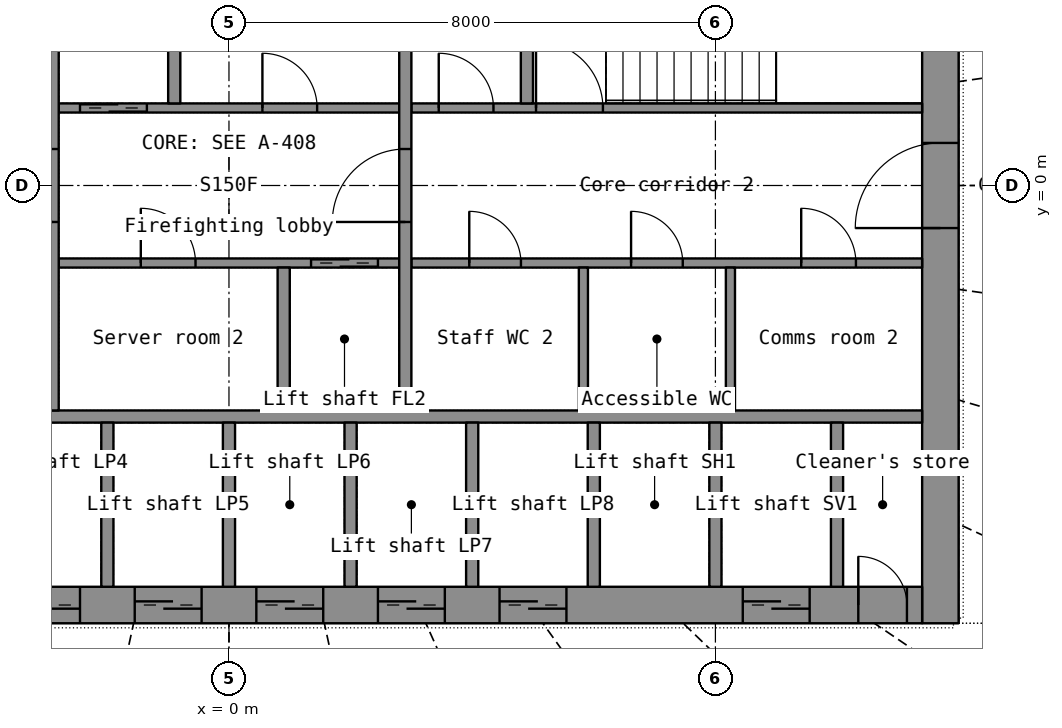
"""IFC4 building model, lengths in metres.
Left out: names, types, materials, properties, quantities, classifications, styles, units other than length and angle.
Written with IfcOpenShell. Run it as: python <this file> out.ifc"""

import sys

from ifc_helpers import new_model, si_unit, direction, frame, frame_2d, origin, place, context, subcontext, project, spatial, rectangle, extrude, element, fill, save


model = new_model("IFC4")
c1 = context("Model", 3, precision=1e-05, world=origin(), true_north=direction((0.0, 1.0)))
c2 = subcontext(c1, "Body", "Model", "MODEL_VIEW")
j1 = project(units=[si_unit("LENGTHUNIT", "METRE"), si_unit("PLANEANGLEUNIT", "RADIAN")], contexts=[c1])
p1 = place(None, origin())
s1 = spatial("IfcSite", under=j1, at=p1, CompositionType="ELEMENT")
p2 = place(p1, origin())
s2 = spatial("IfcBuilding", under=s1, at=p2, CompositionType="ELEMENT")
p3 = place(p2, frame((0.0, 0.0, 40.8)))
s3 = spatial("IfcBuildingStorey", under=s2, at=p3, CompositionType="ELEMENT", Elevation=40.8)
p4 = place(p3, frame((11.7, -7.2, 0.0), z_axis=(0.0, 0.0, 1.0), x_axis=(0.0, 1.0, 0.0)))
e1 = element("IfcWall", 1, at=p4, inside=s3, PredefinedType="SHEAR", context=c2, shape_type="SweptSolid", body=[
    extrude(rectangle(XDim=14.4, YDim=0.6, at=frame_2d((7.2, 0.0))), origin(), (0.0, 0.0, 1.0), 3.3),
])
p5 = place(p4, frame((6.5, 0.0, 0.0)))
e2 = element("IfcOpeningElement", 2, at=p5, cuts=e1, PredefinedType="OPENING", context=c2, shape_type="SweptSolid", body=[
    extrude(rectangle(XDim=1.4, YDim=2.2, at=frame_2d((0.7, 1.1))), frame((0.0, 0.31, 0.0), z_axis=(0.0, -1.0, 0.0), x_axis=(1.0, 0.0, 0.0)), (0.0, 0.0, 1.0), 0.62),
])
p6 = place(p3, frame((-11.4, -6.9, 0.0), z_axis=(0.0, 0.0, 1.0), x_axis=(1.0, 0.0, 0.0)))
e3 = element("IfcWall", 3, at=p6, inside=s3, PredefinedType="SHEAR", context=c2, shape_type="SweptSolid", body=[
    extrude(rectangle(XDim=22.8, YDim=0.6, at=frame_2d((11.4, 0.0))), origin(), (0.0, 0.0, 1.0), 3.3),
])
p7 = place(p6, frame((1.85, 0.0, 0.0)))
e4 = element("IfcOpeningElement", 4, at=p7, cuts=e3, PredefinedType="OPENING", context=c2, shape_type="SweptSolid", body=[
    extrude(rectangle(XDim=1.1, YDim=2.2, at=frame_2d((0.55, 1.1))), frame((0.0, 0.31, 0.0), z_axis=(0.0, -1.0, 0.0), x_axis=(1.0, 0.0, 0.0)), (0.0, 0.0, 1.0), 0.62),
])
p8 = place(p6, frame((3.85, 0.0, 0.0)))
e5 = element("IfcOpeningElement", 5, at=p8, cuts=e3, PredefinedType="OPENING", context=c2, shape_type="SweptSolid", body=[
    extrude(rectangle(XDim=1.1, YDim=2.2, at=frame_2d((0.55, 1.1))), frame((0.0, 0.31, 0.0), z_axis=(0.0, -1.0, 0.0), x_axis=(1.0, 0.0, 0.0)), (0.0, 0.0, 1.0), 0.62),
])
p9 = place(p6, frame((5.85, 0.0, 0.0)))
e6 = element("IfcOpeningElement", 6, at=p9, cuts=e3, PredefinedType="OPENING", context=c2, shape_type="SweptSolid", body=[
    extrude(rectangle(XDim=1.1, YDim=2.2, at=frame_2d((0.55, 1.1))), frame((0.0, 0.31, 0.0), z_axis=(0.0, -1.0, 0.0), x_axis=(1.0, 0.0, 0.0)), (0.0, 0.0, 1.0), 0.62),
])
p10 = place(p6, frame((7.85, 0.0, 0.0)))
e7 = element("IfcOpeningElement", 7, at=p10, cuts=e3, PredefinedType="OPENING", context=c2, shape_type="SweptSolid", body=[
    extrude(rectangle(XDim=1.1, YDim=2.2, at=frame_2d((0.55, 1.1))), frame((0.0, 0.31, 0.0), z_axis=(0.0, -1.0, 0.0), x_axis=(1.0, 0.0, 0.0)), (0.0, 0.0, 1.0), 0.62),
])
p11 = place(p6, frame((9.85, 0.0, 0.0)))
e8 = element("IfcOpeningElement", 8, at=p11, cuts=e3, PredefinedType="OPENING", context=c2, shape_type="SweptSolid", body=[
    extrude(rectangle(XDim=1.1, YDim=2.2, at=frame_2d((0.55, 1.1))), frame((0.0, 0.31, 0.0), z_axis=(0.0, -1.0, 0.0), x_axis=(1.0, 0.0, 0.0)), (0.0, 0.0, 1.0), 0.62),
])
p12 = place(p6, frame((11.85, 0.0, 0.0)))
e9 = element("IfcOpeningElement", 9, at=p12, cuts=e3, PredefinedType="OPENING", context=c2, shape_type="SweptSolid", body=[
    extrude(rectangle(XDim=1.1, YDim=2.2, at=frame_2d((0.55, 1.1))), frame((0.0, 0.31, 0.0), z_axis=(0.0, -1.0, 0.0), x_axis=(1.0, 0.0, 0.0)), (0.0, 0.0, 1.0), 0.62),
])
p13 = place(p6, frame((13.85, 0.0, 0.0)))
e10 = element("IfcOpeningElement", 10, at=p13, cuts=e3, PredefinedType="OPENING", context=c2, shape_type="SweptSolid", body=[
    extrude(rectangle(XDim=1.1, YDim=2.2, at=frame_2d((0.55, 1.1))), frame((0.0, 0.31, 0.0), z_axis=(0.0, -1.0, 0.0), x_axis=(1.0, 0.0, 0.0)), (0.0, 0.0, 1.0), 0.62),
])
p14 = place(p6, frame((15.85, 0.0, 0.0)))
e11 = element("IfcOpeningElement", 11, at=p14, cuts=e3, PredefinedType="OPENING", context=c2, shape_type="SweptSolid", body=[
    extrude(rectangle(XDim=1.1, YDim=2.2, at=frame_2d((0.55, 1.1))), frame((0.0, 0.31, 0.0), z_axis=(0.0, -1.0, 0.0), x_axis=(1.0, 0.0, 0.0)), (0.0, 0.0, 1.0), 0.62),
])
p15 = place(p6, frame((19.85, 0.0, 0.0)))
e12 = element("IfcOpeningElement", 12, at=p15, cuts=e3, PredefinedType="OPENING", context=c2, shape_type="SweptSolid", body=[
    extrude(rectangle(XDim=1.1, YDim=2.2, at=frame_2d((0.55, 1.1))), frame((0.0, 0.31, 0.0), z_axis=(0.0, -1.0, 0.0), x_axis=(1.0, 0.0, 0.0)), (0.0, 0.0, 1.0), 0.62),
])
p16 = place(p6, frame((0.25, 0.0, 0.0)))
e13 = element("IfcOpeningElement", 13, at=p16, cuts=e3, PredefinedType="OPENING", context=c2, shape_type="SweptSolid", body=[
    extrude(rectangle(XDim=0.8, YDim=2.05, at=frame_2d((0.4, 1.025))), frame((0.0, 0.31, 0.0), z_axis=(0.0, -1.0, 0.0), x_axis=(1.0, 0.0, 0.0)), (0.0, 0.0, 1.0), 0.62),
])
p17 = place(p6, frame((21.75, 0.0, 0.0)))
e14 = element("IfcOpeningElement", 14, at=p17, cuts=e3, PredefinedType="OPENING", context=c2, shape_type="SweptSolid", body=[
    extrude(rectangle(XDim=0.8, YDim=2.05, at=frame_2d((0.4, 1.025))), frame((0.0, 0.31, 0.0), z_axis=(0.0, -1.0, 0.0), x_axis=(1.0, 0.0, 0.0)), (0.0, 0.0, 1.0), 0.62),
])
p18 = place(p3, frame((-11.4, -3.8, 0.0), z_axis=(0.0, 0.0, 1.0), x_axis=(1.0, 0.0, 0.0)))
e15 = element("IfcWall", 15, at=p18, inside=s3, PredefinedType="SHEAR", context=c2, shape_type="SweptSolid", body=[
    extrude(rectangle(XDim=22.8, YDim=0.2, at=frame_2d((11.4, 0.0))), origin(), (0.0, 0.0, 1.0), 3.3),
])
for number, where, z_axis, x_axis in (
    (16, (-2.0, -6.6, 0.0), (0.0, 0.0, 1.0), (0.0, 1.0, 0.0)),
    (17, (0.0, -6.6, 0.0), (0.0, 0.0, 1.0), (0.0, 1.0, 0.0)),
    (18, (2.0, -6.6, 0.0), (0.0, 0.0, 1.0), (0.0, 1.0, 0.0)),
    (19, (4.0, -6.6, 0.0), (0.0, 0.0, 1.0), (0.0, 1.0, 0.0)),
    (20, (6.0, -6.6, 0.0), (0.0, 0.0, 1.0), (0.0, 1.0, 0.0)),
    (21, (8.0, -6.6, 0.0), (0.0, 0.0, 1.0), (0.0, 1.0, 0.0)),
    (22, (10.0, -6.6, 0.0), (0.0, 0.0, 1.0), (0.0, 1.0, 0.0)),
):
    element("IfcWall", number, at=place(p3, frame(where, z_axis=z_axis, x_axis=x_axis)), inside=s3, PredefinedType="SHEAR", context=c2, shape_type="SweptSolid", body=[
        extrude(rectangle(XDim=2.7, YDim=0.2, at=frame_2d((1.35, 0.0))), origin(), (0.0, 0.0, 1.0), 3.3),
    ])
p19 = place(p3, frame((-2.8, -1.275, 0.0), z_axis=(0.0, 0.0, 1.0), x_axis=(1.0, 0.0, 0.0)))
e23 = element("IfcWall", 23, at=p19, inside=s3, PredefinedType="SHEAR", context=c2, shape_type="SweptSolid", body=[
    extrude(rectangle(XDim=5.6, YDim=0.15, at=frame_2d((2.8, 0.0))), origin(), (0.0, 0.0, 1.0), 3.3),
])
p20 = place(p19, frame((4.15, 0.0, 0.0)))
e24 = element("IfcOpeningElement", 24, at=p20, cuts=e23, PredefinedType="OPENING", context=c2, shape_type="SweptSolid", body=[
    extrude(rectangle(XDim=1.1, YDim=2.2, at=frame_2d((0.55, 1.1))), frame((0.0, 0.085, 0.0), z_axis=(0.0, -1.0, 0.0), x_axis=(1.0, 0.0, 0.0)), (0.0, 0.0, 1.0), 0.17),
])
p21 = place(p19, frame((1.35, 0.0, 0.0)))
e25 = element("IfcOpeningElement", 25, at=p21, cuts=e23, PredefinedType="OPENING", context=c2, shape_type="SweptSolid", body=[
    extrude(rectangle(XDim=0.9, YDim=2.1, at=frame_2d((0.45, 1.05))), frame((0.0, 0.085, 0.0), z_axis=(0.0, -1.0, 0.0), x_axis=(1.0, 0.0, 0.0)), (0.0, 0.0, 1.0), 0.17),
])
p22 = place(p3, frame((3.0, -1.275, 0.0), z_axis=(0.0, 0.0, 1.0), x_axis=(1.0, 0.0, 0.0)))
e26 = element("IfcWall", 26, at=p22, inside=s3, PredefinedType="PARTITIONING", context=c2, shape_type="SweptSolid", body=[
    extrude(rectangle(XDim=8.4, YDim=0.15, at=frame_2d((4.2, 0.0))), origin(), (0.0, 0.0, 1.0), 3.3),
])
p23 = place(p22, frame((0.952, 0.0, 0.0)))
e27 = element("IfcOpeningElement", 27, at=p23, cuts=e26, PredefinedType="OPENING", context=c2, shape_type="SweptSolid", body=[
    extrude(rectangle(XDim=0.85, YDim=2.1, at=frame_2d((0.425, 1.05))), frame((0.0, 0.085, 0.0), z_axis=(0.0, -1.0, 0.0), x_axis=(1.0, 0.0, 0.0)), (0.0, 0.0, 1.0), 0.17),
])
p24 = place(p22, frame((3.613, 0.0, 0.0)))
e28 = element("IfcOpeningElement", 28, at=p24, cuts=e26, PredefinedType="OPENING", context=c2, shape_type="SweptSolid", body=[
    extrude(rectangle(XDim=0.85, YDim=2.1, at=frame_2d((0.425, 1.05))), frame((0.0, 0.085, 0.0), z_axis=(0.0, -1.0, 0.0), x_axis=(1.0, 0.0, 0.0)), (0.0, 0.0, 1.0), 0.17),
])
p25 = place(p22, frame((6.411, 0.0, 0.0)))
e29 = element("IfcOpeningElement", 29, at=p25, cuts=e26, PredefinedType="OPENING", context=c2, shape_type="SweptSolid", body=[
    extrude(rectangle(XDim=0.9, YDim=2.1, at=frame_2d((0.45, 1.05))), frame((0.0, 0.085, 0.0), z_axis=(0.0, -1.0, 0.0), x_axis=(1.0, 0.0, 0.0)), (0.0, 0.0, 1.0), 0.17),
])
p26 = place(p3, frame((-2.8, 1.275, 0.0), z_axis=(0.0, 0.0, 1.0), x_axis=(1.0, 0.0, 0.0)))
e30 = element("IfcWall", 30, at=p26, inside=s3, PredefinedType="SHEAR", context=c2, shape_type="SweptSolid", body=[
    extrude(rectangle(XDim=5.6, YDim=0.15, at=frame_2d((2.8, 0.0))), origin(), (0.0, 0.0, 1.0), 3.3),
])
p27 = place(p26, frame((0.35, 0.0, 0.0)))
e31 = element("IfcOpeningElement", 31, at=p27, cuts=e30, PredefinedType="OPENING", context=c2, shape_type="SweptSolid", body=[
    extrude(rectangle(XDim=1.1, YDim=2.2, at=frame_2d((0.55, 1.1))), frame((0.0, 0.085, 0.0), z_axis=(0.0, -1.0, 0.0), x_axis=(1.0, 0.0, 0.0)), (0.0, 0.0, 1.0), 0.17),
])
p28 = place(p26, frame((3.35, 0.0, 0.0)))
e32 = element("IfcOpeningElement", 32, at=p28, cuts=e30, PredefinedType="OPENING", context=c2, shape_type="SweptSolid", body=[
    extrude(rectangle(XDim=0.9, YDim=2.1, at=frame_2d((0.45, 1.05))), frame((0.0, 0.085, 0.0), z_axis=(0.0, -1.0, 0.0), x_axis=(1.0, 0.0, 0.0)), (0.0, 0.0, 1.0), 0.17),
])
p29 = place(p3, frame((3.0, 1.275, 0.0), z_axis=(0.0, 0.0, 1.0), x_axis=(1.0, 0.0, 0.0)))
e33 = element("IfcWall", 33, at=p29, inside=s3, PredefinedType="SHEAR", context=c2, shape_type="SweptSolid", body=[
    extrude(rectangle(XDim=8.4, YDim=0.15, at=frame_2d((4.2, 0.0))), origin(), (0.0, 0.0, 1.0), 3.3),
])
p30 = place(p29, frame((2.05, 0.0, 0.0)))
e34 = element("IfcOpeningElement", 34, at=p30, cuts=e33, PredefinedType="OPENING", context=c2, shape_type="SweptSolid", body=[
    extrude(rectangle(XDim=1.1, YDim=2.15, at=frame_2d((0.55, 1.075))), frame((0.0, 0.085, 0.0), z_axis=(0.0, -1.0, 0.0), x_axis=(1.0, 0.0, 0.0)), (0.0, 0.0, 1.0), 0.17),
])
p31 = place(p29, frame((0.45, 0.0, 0.0)))
e35 = element("IfcOpeningElement", 35, at=p31, cuts=e33, PredefinedType="OPENING", context=c2, shape_type="SweptSolid", body=[
    extrude(rectangle(XDim=0.9, YDim=2.1, at=frame_2d((0.45, 1.05))), frame((0.0, 0.085, 0.0), z_axis=(0.0, -1.0, 0.0), x_axis=(1.0, 0.0, 0.0)), (0.0, 0.0, 1.0), 0.17),
])
p32 = place(p3, frame((-2.9, -3.7, 0.0), z_axis=(0.0, 0.0, 1.0), x_axis=(0.0, 1.0, 0.0)))
e36 = element("IfcWall", 36, at=p32, inside=s3, PredefinedType="SHEAR", context=c2, shape_type="SweptSolid", body=[
    extrude(rectangle(XDim=7.4, YDim=0.2, at=frame_2d((3.7, 0.0))), origin(), (0.0, 0.0, 1.0), 3.3),
])
p33 = place(p32, frame((3.1, 0.0, 0.0)))
e37 = element("IfcOpeningElement", 37, at=p33, cuts=e36, PredefinedType="OPENING", context=c2, shape_type="SweptSolid", body=[
    extrude(rectangle(XDim=1.2, YDim=2.2, at=frame_2d((0.6, 1.1))), frame((0.0, 0.11, 0.0), z_axis=(0.0, -1.0, 0.0), x_axis=(1.0, 0.0, 0.0)), (0.0, 0.0, 1.0), 0.22),
])
p34 = place(p3, frame((2.9, -3.7, 0.0), z_axis=(0.0, 0.0, 1.0), x_axis=(0.0, 1.0, 0.0)))
e38 = element("IfcWall", 38, at=p34, inside=s3, PredefinedType="SHEAR", context=c2, shape_type="SweptSolid", body=[
    extrude(rectangle(XDim=7.4, YDim=0.2, at=frame_2d((3.7, 0.0))), origin(), (0.0, 0.0, 1.0), 3.3),
])
p35 = place(p34, frame((3.1, 0.0, 0.0)))
e39 = element("IfcOpeningElement", 39, at=p35, cuts=e38, PredefinedType="OPENING", context=c2, shape_type="SweptSolid", body=[
    extrude(rectangle(XDim=1.2, YDim=2.2, at=frame_2d((0.6, 1.1))), frame((0.0, 0.11, 0.0), z_axis=(0.0, -1.0, 0.0), x_axis=(1.0, 0.0, 0.0)), (0.0, 0.0, 1.0), 0.22),
])
for number, where, z_axis, x_axis in (
    (40, (-0.9, 1.35, 0.0), (0.0, 0.0, 1.0), (0.0, 1.0, 0.0)),
    (41, (0.9, -3.7, 0.0), (0.0, 0.0, 1.0), (0.0, 1.0, 0.0)),
    (42, (4.9, 1.35, 0.0), (0.0, 0.0, 1.0), (0.0, 1.0, 0.0)),
):
    element("IfcWall", number, at=place(p3, frame(where, z_axis=z_axis, x_axis=x_axis)), inside=s3, PredefinedType="SHEAR", context=c2, shape_type="SweptSolid", body=[
        extrude(rectangle(XDim=2.35, YDim=0.2, at=frame_2d((1.175, 0.0))), origin(), (0.0, 0.0, 1.0), 3.3),
    ])
for number, where, z_axis, x_axis in (
    (43, (5.829, -3.7, 0.0), (0.0, 0.0, 1.0), (0.0, 1.0, 0.0)),
    (44, (8.247, -3.7, 0.0), (0.0, 0.0, 1.0), (0.0, 1.0, 0.0)),
):
    element("IfcWall", number, at=place(p3, frame(where, z_axis=z_axis, x_axis=x_axis)), inside=s3, PredefinedType="PARTITIONING", context=c2, shape_type="SweptSolid", body=[
        extrude(rectangle(XDim=2.35, YDim=0.15, at=frame_2d((1.175, 0.0))), origin(), (0.0, 0.0, 1.0), 3.3),
    ])
p36 = place(p10, origin())
e45 = element("IfcDoor", 45, at=p36, inside=s3, OperationType="DOUBLE_DOOR_SLIDING", PredefinedType="DOOR", context=c2, shape_type="SweptSolid", body=[
    extrude(rectangle(XDim=1.1, YDim=2.2, at=frame_2d((0.55, 1.1))), frame((0.0, 0.025, 0.0), z_axis=(0.0, -1.0, 0.0), x_axis=(1.0, 0.0, 0.0)), (0.0, 0.0, 1.0), 0.05),
])
fill(e7, e45)
p37 = place(p11, origin())
e46 = element("IfcDoor", 46, at=p37, inside=s3, OperationType="DOUBLE_DOOR_SLIDING", PredefinedType="DOOR", context=c2, shape_type="SweptSolid", body=[
    extrude(rectangle(XDim=1.1, YDim=2.2, at=frame_2d((0.55, 1.1))), frame((0.0, 0.025, 0.0), z_axis=(0.0, -1.0, 0.0), x_axis=(1.0, 0.0, 0.0)), (0.0, 0.0, 1.0), 0.05),
])
fill(e8, e46)
p38 = place(p12, origin())
e47 = element("IfcDoor", 47, at=p38, inside=s3, OperationType="DOUBLE_DOOR_SLIDING", PredefinedType="DOOR", context=c2, shape_type="SweptSolid", body=[
    extrude(rectangle(XDim=1.1, YDim=2.2, at=frame_2d((0.55, 1.1))), frame((0.0, 0.025, 0.0), z_axis=(0.0, -1.0, 0.0), x_axis=(1.0, 0.0, 0.0)), (0.0, 0.0, 1.0), 0.05),
])
fill(e9, e47)
p39 = place(p13, origin())
e48 = element("IfcDoor", 48, at=p39, inside=s3, OperationType="DOUBLE_DOOR_SLIDING", PredefinedType="DOOR", context=c2, shape_type="SweptSolid", body=[
    extrude(rectangle(XDim=1.1, YDim=2.2, at=frame_2d((0.55, 1.1))), frame((0.0, 0.025, 0.0), z_axis=(0.0, -1.0, 0.0), x_axis=(1.0, 0.0, 0.0)), (0.0, 0.0, 1.0), 0.05),
])
fill(e10, e48)
p40 = place(p14, origin())
e49 = element("IfcDoor", 49, at=p40, inside=s3, OperationType="DOUBLE_DOOR_SLIDING", PredefinedType="DOOR", context=c2, shape_type="SweptSolid", body=[
    extrude(rectangle(XDim=1.1, YDim=2.2, at=frame_2d((0.55, 1.1))), frame((0.0, 0.025, 0.0), z_axis=(0.0, -1.0, 0.0), x_axis=(1.0, 0.0, 0.0)), (0.0, 0.0, 1.0), 0.05),
])
fill(e11, e49)
p41 = place(p15, origin())
e50 = element("IfcDoor", 50, at=p41, inside=s3, OperationType="DOUBLE_DOOR_SLIDING", PredefinedType="DOOR", context=c2, shape_type="SweptSolid", body=[
    extrude(rectangle(XDim=1.1, YDim=2.2, at=frame_2d((0.55, 1.1))), frame((0.0, 0.025, 0.0), z_axis=(0.0, -1.0, 0.0), x_axis=(1.0, 0.0, 0.0)), (0.0, 0.0, 1.0), 0.05),
])
fill(e12, e50)
p42 = place(p17, origin())
e51 = element("IfcDoor", 51, at=p42, inside=s3, OperationType="SINGLE_SWING_LEFT", PredefinedType="DOOR", context=c2, shape_type="SweptSolid", body=[
    extrude(rectangle(XDim=0.8, YDim=2.05, at=frame_2d((0.4, 1.025))), frame((0.0, 0.025, 0.0), z_axis=(0.0, -1.0, 0.0), x_axis=(1.0, 0.0, 0.0)), (0.0, 0.0, 1.0), 0.05),
])
fill(e14, e51)
p43 = place(p5, origin())
e52 = element("IfcDoor", 52, at=p43, inside=s3, OperationType="DOUBLE_DOOR_SINGLE_SWING", PredefinedType="DOOR", context=c2, shape_type="SweptSolid", body=[
    extrude(rectangle(XDim=1.4, YDim=2.2, at=frame_2d((0.7, 1.1))), frame((0.0, 0.025, 0.0), z_axis=(0.0, -1.0, 0.0), x_axis=(1.0, 0.0, 0.0)), (0.0, 0.0, 1.0), 0.05),
])
fill(e2, e52)
p44 = place(p33, origin())
e53 = element("IfcDoor", 53, at=p44, inside=s3, OperationType="SINGLE_SWING_LEFT", PredefinedType="DOOR", context=c2, shape_type="SweptSolid", body=[
    extrude(rectangle(XDim=1.2, YDim=2.2, at=frame_2d((0.6, 1.1))), frame((0.0, 0.025, 0.0), z_axis=(0.0, -1.0, 0.0), x_axis=(1.0, 0.0, 0.0)), (0.0, 0.0, 1.0), 0.05),
])
fill(e37, e53)
p45 = place(p35, origin())
e54 = element("IfcDoor", 54, at=p45, inside=s3, OperationType="SINGLE_SWING_LEFT", PredefinedType="DOOR", context=c2, shape_type="SweptSolid", body=[
    extrude(rectangle(XDim=1.2, YDim=2.2, at=frame_2d((0.6, 1.1))), frame((0.0, 0.025, 0.0), z_axis=(0.0, -1.0, 0.0), x_axis=(1.0, 0.0, 0.0)), (0.0, 0.0, 1.0), 0.05),
])
fill(e39, e54)
p46 = place(p27, origin())
e55 = element("IfcDoor", 55, at=p46, inside=s3, OperationType="DOUBLE_DOOR_SLIDING", PredefinedType="DOOR", context=c2, shape_type="SweptSolid", body=[
    extrude(rectangle(XDim=1.1, YDim=2.2, at=frame_2d((0.55, 1.1))), frame((0.0, 0.025, 0.0), z_axis=(0.0, -1.0, 0.0), x_axis=(1.0, 0.0, 0.0)), (0.0, 0.0, 1.0), 0.05),
])
fill(e31, e55)
p47 = place(p20, origin())
e56 = element("IfcDoor", 56, at=p47, inside=s3, OperationType="DOUBLE_DOOR_SLIDING", PredefinedType="DOOR", context=c2, shape_type="SweptSolid", body=[
    extrude(rectangle(XDim=1.1, YDim=2.2, at=frame_2d((0.55, 1.1))), frame((0.0, 0.025, 0.0), z_axis=(0.0, -1.0, 0.0), x_axis=(1.0, 0.0, 0.0)), (0.0, 0.0, 1.0), 0.05),
])
fill(e24, e56)
p48 = place(p30, origin())
e57 = element("IfcDoor", 57, at=p48, inside=s3, OperationType="SINGLE_SWING_LEFT", PredefinedType="DOOR", context=c2, shape_type="SweptSolid", body=[
    extrude(rectangle(XDim=1.1, YDim=2.15, at=frame_2d((0.55, 1.075))), frame((0.0, 0.025, 0.0), z_axis=(0.0, -1.0, 0.0), x_axis=(1.0, 0.0, 0.0)), (0.0, 0.0, 1.0), 0.05),
])
fill(e34, e57)
p49 = place(p23, origin())
e58 = element("IfcDoor", 58, at=p49, inside=s3, OperationType="SINGLE_SWING_LEFT", PredefinedType="DOOR", context=c2, shape_type="SweptSolid", body=[
    extrude(rectangle(XDim=0.85, YDim=2.1, at=frame_2d((0.425, 1.05))), frame((0.0, 0.025, 0.0), z_axis=(0.0, -1.0, 0.0), x_axis=(1.0, 0.0, 0.0)), (0.0, 0.0, 1.0), 0.05),
])
fill(e27, e58)
p50 = place(p24, origin())
e59 = element("IfcDoor", 59, at=p50, inside=s3, OperationType="SINGLE_SWING_LEFT", PredefinedType="DOOR", context=c2, shape_type="SweptSolid", body=[
    extrude(rectangle(XDim=0.85, YDim=2.1, at=frame_2d((0.425, 1.05))), frame((0.0, 0.025, 0.0), z_axis=(0.0, -1.0, 0.0), x_axis=(1.0, 0.0, 0.0)), (0.0, 0.0, 1.0), 0.05),
])
fill(e28, e59)
p51 = place(p25, origin())
e60 = element("IfcDoor", 60, at=p51, inside=s3, OperationType="SINGLE_SWING_LEFT", PredefinedType="DOOR", context=c2, shape_type="SweptSolid", body=[
    extrude(rectangle(XDim=0.9, YDim=2.1, at=frame_2d((0.45, 1.05))), frame((0.0, 0.025, 0.0), z_axis=(0.0, -1.0, 0.0), x_axis=(1.0, 0.0, 0.0)), (0.0, 0.0, 1.0), 0.05),
])
fill(e29, e60)
p52 = place(p28, origin())
e61 = element("IfcDoor", 61, at=p52, inside=s3, OperationType="SINGLE_SWING_LEFT", PredefinedType="DOOR", context=c2, shape_type="SweptSolid", body=[
    extrude(rectangle(XDim=0.9, YDim=2.1, at=frame_2d((0.45, 1.05))), frame((0.0, 0.025, 0.0), z_axis=(0.0, -1.0, 0.0), x_axis=(1.0, 0.0, 0.0)), (0.0, 0.0, 1.0), 0.05),
])
fill(e32, e61)
p53 = place(p21, origin())
e62 = element("IfcDoor", 62, at=p53, inside=s3, OperationType="SINGLE_SWING_LEFT", PredefinedType="DOOR", context=c2, shape_type="SweptSolid", body=[
    extrude(rectangle(XDim=0.9, YDim=2.1, at=frame_2d((0.45, 1.05))), frame((0.0, 0.025, 0.0), z_axis=(0.0, -1.0, 0.0), x_axis=(1.0, 0.0, 0.0)), (0.0, 0.0, 1.0), 0.05),
])
fill(e25, e62)
p54 = place(p31, origin())
e63 = element("IfcDoor", 63, at=p54, inside=s3, OperationType="SINGLE_SWING_LEFT", PredefinedType="DOOR", context=c2, shape_type="SweptSolid", body=[
    extrude(rectangle(XDim=0.9, YDim=2.1, at=frame_2d((0.45, 1.05))), frame((0.0, 0.025, 0.0), z_axis=(0.0, -1.0, 0.0), x_axis=(1.0, 0.0, 0.0)), (0.0, 0.0, 1.0), 0.05),
])
fill(e35, e63)
save(model, sys.argv[1])
